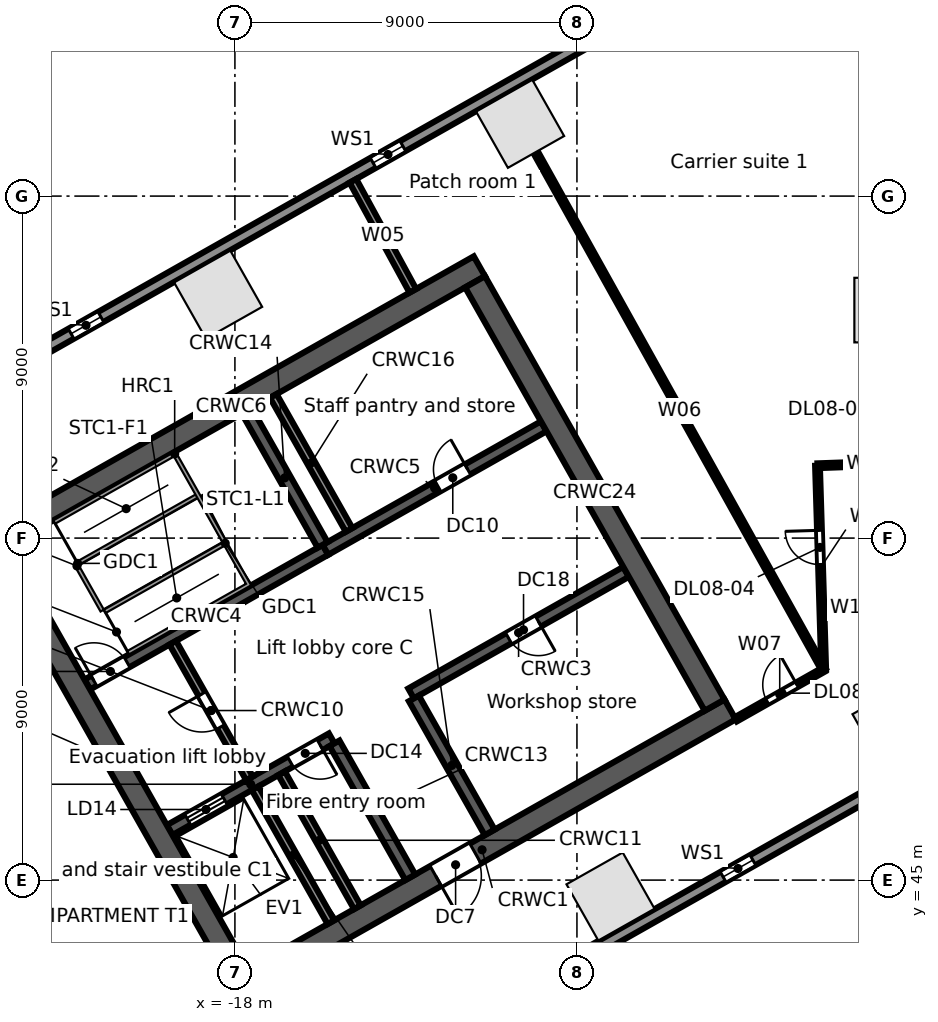
"""IFC4 building model, lengths in metres.
Left out: names, types, materials, properties, quantities, classifications, styles, units other than length and angle.
Written with IfcOpenShell. Run it as: python <this file> out.ifc"""

import sys

from ifc_helpers import new_model, si_unit, direction, frame, frame_2d, origin, origin_2d, place, context, subcontext, project, spatial, rectangle, extrude, element, fill, save


model = new_model("IFC4")
c1 = context("Model", 3, precision=1e-05, world=origin(), true_north=direction((0.0, 1.0)))
c2 = subcontext(c1, "Body", "Model", "MODEL_VIEW")
j1 = project(units=[si_unit("LENGTHUNIT", "METRE"), si_unit("PLANEANGLEUNIT", "RADIAN")], contexts=[c1])
p1 = place(None, origin())
s1 = spatial("IfcSite", under=j1, at=p1, CompositionType="ELEMENT")
p2 = place(p1, origin())
s2 = spatial("IfcBuilding", under=s1, at=p2, CompositionType="ELEMENT")
p3 = place(p2, frame((0.0, 0.0, 41.5)))
s3 = spatial("IfcBuildingStorey", under=s2, at=p3, CompositionType="ELEMENT", Elevation=41.5)
for number, where, z_axis, x_axis in (
    (1, (-10.495, 64.902, 0.0), (0.0, 0.0, 1.0), (-0.87, -0.492, 0.0)),
    (2, (-18.441, 60.406, 0.0), (0.0, 0.0, 1.0), (-0.87, -0.492, 0.0)),
    (3, (-8.117, 44.568, 0.0), (0.0, 0.0, 1.0), (0.87, 0.492, 0.0)),
    (4, (-0.591, 49.044, 0.0), (0.0, 0.0, 1.0), (0.87, 0.492, 0.0)),
    (5, (-0.85, 60.0, 0.0), (0.0, 0.0, 1.0), (0.0, 1.0, 0.0)),
):
    element("IfcColumn", number, at=place(p3, frame(where, z_axis=z_axis, x_axis=x_axis)), inside=s3, PredefinedType="COLUMN", context=c2, shape_type="SweptSolid", body=[
        extrude(rectangle(XDim=1.7, YDim=1.7, at=origin_2d()), origin(), (0.0, 0.0, 1.0), 5.0),
    ])
p4 = place(p3, frame((-58.745, 38.764, 0.0), z_axis=(0.0, 0.0, 1.0), x_axis=(0.870355811726, 0.492423355453, 0.0)))
e6 = element("IfcWall", 6, at=p4, inside=s3, PredefinedType="STANDARD", context=c2, shape_type="SweptSolid", body=[
    extrude(rectangle(XDim=64.025, YDim=0.3, at=frame_2d((32.013, 0.0))), origin(), (0.0, 0.0, 1.0), 4.68),
])
p5 = place(p4, frame((60.122, 0.0, 0.6)))
e7 = element("IfcOpeningElement", 7, at=p5, cuts=e6, PredefinedType="OPENING", context=c2, shape_type="SweptSolid", body=[
    extrude(rectangle(XDim=0.9, YDim=3.2, at=frame_2d((0.45, 1.6))), frame((0.0, 0.16, 0.0), z_axis=(0.0, -1.0, 0.0), x_axis=(1.0, 0.0, 0.0)), (0.0, 0.0, 1.0), 0.32),
])
p6 = place(p4, frame((50.992, 0.0, 0.6)))
e8 = element("IfcOpeningElement", 8, at=p6, cuts=e6, PredefinedType="OPENING", context=c2, shape_type="SweptSolid", body=[
    extrude(rectangle(XDim=0.9, YDim=3.2, at=frame_2d((0.45, 1.6))), frame((0.0, 0.16, 0.0), z_axis=(0.0, -1.0, 0.0), x_axis=(1.0, 0.0, 0.0)), (0.0, 0.0, 1.0), 0.32),
])
p7 = place(p4, frame((41.862, 0.0, 0.6)))
e9 = element("IfcOpeningElement", 9, at=p7, cuts=e6, PredefinedType="OPENING", context=c2, shape_type="SweptSolid", body=[
    extrude(rectangle(XDim=0.9, YDim=3.2, at=frame_2d((0.45, 1.6))), frame((0.0, 0.16, 0.0), z_axis=(0.0, -1.0, 0.0), x_axis=(1.0, 0.0, 0.0)), (0.0, 0.0, 1.0), 0.32),
])
p8 = place(p4, frame((32.732, 0.0, 0.6)))
e10 = element("IfcOpeningElement", 10, at=p8, cuts=e6, PredefinedType="OPENING", context=c2, shape_type="SweptSolid", body=[
    extrude(rectangle(XDim=0.9, YDim=3.2, at=frame_2d((0.45, 1.6))), frame((0.0, 0.16, 0.0), z_axis=(0.0, -1.0, 0.0), x_axis=(1.0, 0.0, 0.0)), (0.0, 0.0, 1.0), 0.32),
])
p9 = place(p4, frame((23.602, 0.0, 0.6)))
e11 = element("IfcOpeningElement", 11, at=p9, cuts=e6, PredefinedType="OPENING", context=c2, shape_type="SweptSolid", body=[
    extrude(rectangle(XDim=0.9, YDim=3.2, at=frame_2d((0.45, 1.6))), frame((0.0, 0.16, 0.0), z_axis=(0.0, -1.0, 0.0), x_axis=(1.0, 0.0, 0.0)), (0.0, 0.0, 1.0), 0.32),
])
p10 = place(p4, frame((14.472, 0.0, 0.6)))
e12 = element("IfcOpeningElement", 12, at=p10, cuts=e6, PredefinedType="OPENING", context=c2, shape_type="SweptSolid", body=[
    extrude(rectangle(XDim=0.9, YDim=3.2, at=frame_2d((0.45, 1.6))), frame((0.0, 0.16, 0.0), z_axis=(0.0, -1.0, 0.0), x_axis=(1.0, 0.0, 0.0)), (0.0, 0.0, 1.0), 0.32),
])
p11 = place(p4, frame((5.342, 0.0, 0.6)))
e13 = element("IfcOpeningElement", 13, at=p11, cuts=e6, PredefinedType="OPENING", context=c2, shape_type="SweptSolid", body=[
    extrude(rectangle(XDim=0.9, YDim=3.2, at=frame_2d((0.45, 1.6))), frame((0.0, 0.16, 0.0), z_axis=(0.0, -1.0, 0.0), x_axis=(1.0, 0.0, 0.0)), (0.0, 0.0, 1.0), 0.32),
])
p12 = place(p3, frame((-0.055, 47.969, 0.0), z_axis=(0.0, 0.0, 1.0), x_axis=(-0.870355730478, -0.492423499058, 0.0)))
e14 = element("IfcWall", 14, at=p12, inside=s3, PredefinedType="STANDARD", context=c2, shape_type="SweptSolid", body=[
    extrude(rectangle(XDim=43.75, YDim=0.3, at=frame_2d((21.875, 0.0))), origin(), (0.0, 0.0, 1.0), 4.68),
])
p13 = place(p12, frame((39.977, 0.0, 0.6)))
e15 = element("IfcOpeningElement", 15, at=p13, cuts=e14, PredefinedType="OPENING", context=c2, shape_type="SweptSolid", body=[
    extrude(rectangle(XDim=0.9, YDim=3.2, at=frame_2d((0.45, 1.6))), frame((0.0, 0.16, 0.0), z_axis=(0.0, -1.0, 0.0), x_axis=(1.0, 0.0, 0.0)), (0.0, 0.0, 1.0), 0.32),
])
p14 = place(p12, frame((31.222, 0.0, 0.6)))
e16 = element("IfcOpeningElement", 16, at=p14, cuts=e14, PredefinedType="OPENING", context=c2, shape_type="SweptSolid", body=[
    extrude(rectangle(XDim=0.9, YDim=3.2, at=frame_2d((0.45, 1.6))), frame((0.0, 0.16, 0.0), z_axis=(0.0, -1.0, 0.0), x_axis=(1.0, 0.0, 0.0)), (0.0, 0.0, 1.0), 0.32),
])
p15 = place(p12, frame((22.468, 0.0, 0.6)))
e17 = element("IfcOpeningElement", 17, at=p15, cuts=e14, PredefinedType="OPENING", context=c2, shape_type="SweptSolid", body=[
    extrude(rectangle(XDim=0.9, YDim=3.2, at=frame_2d((0.45, 1.6))), frame((0.0, 0.16, 0.0), z_axis=(0.0, -1.0, 0.0), x_axis=(1.0, 0.0, 0.0)), (0.0, 0.0, 1.0), 0.32),
])
p16 = place(p12, frame((13.713, 0.0, 0.6)))
e18 = element("IfcOpeningElement", 18, at=p16, cuts=e14, PredefinedType="OPENING", context=c2, shape_type="SweptSolid", body=[
    extrude(rectangle(XDim=0.9, YDim=3.2, at=frame_2d((0.45, 1.6))), frame((0.0, 0.16, 0.0), z_axis=(0.0, -1.0, 0.0), x_axis=(1.0, 0.0, 0.0)), (0.0, 0.0, 1.0), 0.32),
])
p17 = place(p12, frame((4.959, 0.0, 0.6)))
e19 = element("IfcOpeningElement", 19, at=p17, cuts=e14, PredefinedType="OPENING", context=c2, shape_type="SweptSolid", body=[
    extrude(rectangle(XDim=0.9, YDim=3.2, at=frame_2d((0.45, 1.6))), frame((0.0, 0.16, 0.0), z_axis=(0.0, -1.0, 0.0), x_axis=(1.0, 0.0, 0.0)), (0.0, 0.0, 1.0), 0.32),
])
p18 = place(p3, frame((-18.024, 42.104, 0.0), z_axis=(0.0, 0.0, 1.0), x_axis=(0.870360574057, 0.492414937962, 0.0)))
e20 = element("IfcWall", 20, at=p18, inside=s3, PredefinedType="SOLIDWALL", context=c2, shape_type="SweptSolid", body=[
    extrude(rectangle(XDim=15.0, YDim=0.6, at=frame_2d((7.5, 0.0))), origin(), (0.0, 0.0, 1.0), 4.68),
])
p19 = place(p18, frame((6.1, 0.0, 0.0)))
e21 = element("IfcOpeningElement", 21, at=p19, cuts=e20, PredefinedType="OPENING", context=c2, shape_type="SweptSolid", body=[
    extrude(rectangle(XDim=1.2, YDim=2.1, at=frame_2d((0.6, 1.05))), frame((0.0, 0.31, 0.0), z_axis=(0.0, -1.0, 0.0), x_axis=(1.0, 0.0, 0.0)), (0.0, 0.0, 1.0), 0.62),
])
p20 = place(p3, frame((-19.718, 46.316, 0.0), z_axis=(0.0, 0.0, 1.0), x_axis=(0.870353963862, 0.492426621528, 0.0)))
e22 = element("IfcWall", 22, at=p20, inside=s3, PredefinedType="SOLIDWALL", context=c2, shape_type="SweptSolid", body=[
    extrude(rectangle(XDim=4.9, YDim=0.3, at=frame_2d((2.45, 0.0))), origin(), (0.0, 0.0, 1.0), 4.68),
])
p21 = place(p20, frame((0.55, 0.0, 0.0)))
e23 = element("IfcOpeningElement", 23, at=p21, cuts=e22, PredefinedType="OPENING", context=c2, shape_type="SweptSolid", body=[
    extrude(rectangle(XDim=1.1, YDim=2.1, at=frame_2d((0.55, 1.05))), frame((0.0, 0.16, 0.0), z_axis=(0.0, -1.0, 0.0), x_axis=(1.0, 0.0, 0.0)), (0.0, 0.0, 1.0), 0.32),
])
p22 = place(p20, frame((3.65, 0.0, 0.0)))
e24 = element("IfcOpeningElement", 24, at=p22, cuts=e22, PredefinedType="OPENING", context=c2, shape_type="SweptSolid", body=[
    extrude(rectangle(XDim=0.9, YDim=2.1, at=frame_2d((0.45, 1.05))), frame((0.0, 0.16, 0.0), z_axis=(0.0, -1.0, 0.0), x_axis=(1.0, 0.0, 0.0)), (0.0, 0.0, 1.0), 0.32),
])
p23 = place(p3, frame((-13.365, 49.911, 0.0), z_axis=(0.0, 0.0, 1.0), x_axis=(0.870340995471, 0.49244954219, 0.0)))
e25 = element("IfcWall", 25, at=p23, inside=s3, PredefinedType="SOLIDWALL", context=c2, shape_type="SweptSolid", body=[
    extrude(rectangle(XDim=6.5, YDim=0.3, at=frame_2d((3.25, 0.0))), origin(), (0.0, 0.0, 1.0), 4.68),
])
p24 = place(p23, frame((2.95, 0.0, 0.0)))
e26 = element("IfcOpeningElement", 26, at=p24, cuts=e25, PredefinedType="OPENING", context=c2, shape_type="SweptSolid", body=[
    extrude(rectangle(XDim=0.9, YDim=2.1, at=frame_2d((0.45, 1.05))), frame((0.0, 0.16, 0.0), z_axis=(0.0, -1.0, 0.0), x_axis=(1.0, 0.0, 0.0)), (0.0, 0.0, 1.0), 0.32),
])
p25 = place(p3, frame((-21.885, 50.146, 0.0), z_axis=(0.0, 0.0, 1.0), x_axis=(0.870359411463, 0.492416992881, 0.0)))
e27 = element("IfcWall", 27, at=p25, inside=s3, PredefinedType="SOLIDWALL", context=c2, shape_type="SweptSolid", body=[
    extrude(rectangle(XDim=7.2, YDim=0.3, at=frame_2d((3.6, 0.0))), origin(), (0.0, 0.0, 1.0), 4.68),
])
p26 = place(p25, frame((0.2, 0.0, 0.0)))
e28 = element("IfcOpeningElement", 28, at=p26, cuts=e27, PredefinedType="OPENING", context=c2, shape_type="SweptSolid", body=[
    extrude(rectangle(XDim=1.0, YDim=2.1, at=frame_2d((0.5, 1.05))), frame((0.0, 0.16, 0.0), z_axis=(0.0, -1.0, 0.0), x_axis=(1.0, 0.0, 0.0)), (0.0, 0.0, 1.0), 0.32),
])
p27 = place(p3, frame((-15.618, 53.691, 0.0), z_axis=(0.0, 0.0, 1.0), x_axis=(0.870356769198, 0.492421663121, 0.0)))
e29 = element("IfcWall", 29, at=p27, inside=s3, PredefinedType="SOLIDWALL", context=c2, shape_type="SweptSolid", body=[
    extrude(rectangle(XDim=6.6, YDim=0.3, at=frame_2d((3.3, 0.0))), origin(), (0.0, 0.0, 1.0), 4.68),
])
p28 = place(p27, frame((3.4, 0.0, 0.0)))
e30 = element("IfcOpeningElement", 30, at=p28, cuts=e29, PredefinedType="OPENING", context=c2, shape_type="SweptSolid", body=[
    extrude(rectangle(XDim=0.9, YDim=2.1, at=frame_2d((0.45, 1.05))), frame((0.0, 0.16, 0.0), z_axis=(0.0, -1.0, 0.0), x_axis=(1.0, 0.0, 0.0)), (0.0, 0.0, 1.0), 0.32),
])
p29 = place(p3, frame((-24.623, 53.767, 0.0), z_axis=(0.0, 0.0, 1.0), x_axis=(0.870356627484, 0.492421913601, 0.0)))
e31 = element("IfcWall", 31, at=p29, inside=s3, PredefinedType="SOLIDWALL", context=c2, shape_type="SweptSolid", body=[
    extrude(rectangle(XDim=15.0, YDim=0.6, at=frame_2d((7.5, 0.0))), origin(), (0.0, 0.0, 1.0), 4.68),
])
p30 = place(p3, frame((-24.214, 53.654, 0.0), z_axis=(0.0, 0.0, 1.0), x_axis=(0.492441221355, -0.870345703448, 0.0)))
e32 = element("IfcWall", 32, at=p30, inside=s3, PredefinedType="SOLIDWALL", context=c2, shape_type="SweptSolid", body=[
    extrude(rectangle(XDim=12.8, YDim=0.6, at=frame_2d((6.4, 0.0))), origin(), (0.0, 0.0, 1.0), 4.68),
])
p31 = place(p3, frame((-17.469, 47.417, 0.0), z_axis=(0.0, 0.0, 1.0), x_axis=(0.492440575896, -0.870346068648, 0.0)))
e33 = element("IfcWall", 33, at=p31, inside=s3, PredefinedType="SOLIDWALL", context=c2, shape_type="SweptSolid", body=[
    extrude(rectangle(XDim=4.05, YDim=0.2, at=frame_2d((2.025, 0.0))), origin(), (0.0, 0.0, 1.0), 4.68),
])
p32 = place(p3, frame((-19.635, 51.246, 0.0), z_axis=(0.0, 0.0, 1.0), x_axis=(0.492408451753, -0.87036424366, 0.0)))
e34 = element("IfcWall", 34, at=p32, inside=s3, PredefinedType="PARTITIONING", context=c2, shape_type="SweptSolid", body=[
    extrude(rectangle(XDim=4.1, YDim=0.2, at=frame_2d((2.05, 0.0))), origin(), (0.0, 0.0, 1.0), 4.68),
])
p33 = place(p32, frame((1.55, 0.0, 0.0)))
e35 = element("IfcOpeningElement", 35, at=p33, cuts=e34, PredefinedType="OPENING", context=c2, shape_type="SweptSolid", body=[
    extrude(rectangle(XDim=1.0, YDim=2.1, at=frame_2d((0.5, 1.05))), frame((0.0, 0.11, 0.0), z_axis=(0.0, -1.0, 0.0), x_axis=(1.0, 0.0, 0.0)), (0.0, 0.0, 1.0), 0.22),
])
p34 = place(p3, frame((-16.772, 47.811, 0.0), z_axis=(0.0, 0.0, 1.0), x_axis=(0.492440575896, -0.870346068648, 0.0)))
e36 = element("IfcWall", 36, at=p34, inside=s3, PredefinedType="SOLIDWALL", context=c2, shape_type="SweptSolid", body=[
    extrude(rectangle(XDim=4.05, YDim=0.2, at=frame_2d((2.025, 0.0))), origin(), (0.0, 0.0, 1.0), 4.68),
])
p35 = place(p3, frame((-15.379, 48.599, 0.0), z_axis=(0.0, 0.0, 1.0), x_axis=(0.492394910396, -0.870371904542, 0.0)))
e37 = element("IfcWall", 37, at=p35, inside=s3, PredefinedType="SOLIDWALL", context=c2, shape_type="SweptSolid", body=[
    extrude(rectangle(XDim=4.05, YDim=0.3, at=frame_2d((2.025, 0.0))), origin(), (0.0, 0.0, 1.0), 4.68),
])
p36 = place(p3, frame((-17.686, 57.347, 0.0), z_axis=(0.0, 0.0, 1.0), x_axis=(0.492420746998, -0.870357287513, 0.0)))
e38 = element("IfcWall", 38, at=p36, inside=s3, PredefinedType="SOLIDWALL", context=c2, shape_type="SweptSolid", body=[
    extrude(rectangle(XDim=4.05, YDim=0.3, at=frame_2d((2.025, 0.0))), origin(), (0.0, 0.0, 1.0), 4.68),
])
p37 = place(p3, frame((-13.291, 49.781, 0.0), z_axis=(0.0, 0.0, 1.0), x_axis=(0.492394910396, -0.870371904542, 0.0)))
e39 = element("IfcWall", 39, at=p37, inside=s3, PredefinedType="SOLIDWALL", context=c2, shape_type="SweptSolid", body=[
    extrude(rectangle(XDim=4.05, YDim=0.3, at=frame_2d((2.025, 0.0))), origin(), (0.0, 0.0, 1.0), 4.68),
])
p38 = place(p3, frame((-16.99, 57.741, 0.0), z_axis=(0.0, 0.0, 1.0), x_axis=(0.492394910396, -0.870371904542, 0.0)))
e40 = element("IfcWall", 40, at=p38, inside=s3, PredefinedType="SOLIDWALL", context=c2, shape_type="SweptSolid", body=[
    extrude(rectangle(XDim=4.05, YDim=0.2, at=frame_2d((2.025, 0.0))), origin(), (0.0, 0.0, 1.0), 4.68),
])
p39 = place(p3, frame((-11.681, 60.744, 0.0), z_axis=(0.0, 0.0, 1.0), x_axis=(0.492426772896, -0.870353878221, 0.0)))
e41 = element("IfcWall", 41, at=p39, inside=s3, PredefinedType="SOLIDWALL", context=c2, shape_type="SweptSolid", body=[
    extrude(rectangle(XDim=12.8, YDim=0.6, at=frame_2d((6.4, 0.0))), origin(), (0.0, 0.0, 1.0), 4.68),
])
p40 = place(p3, frame((-14.894, 63.401, 0.0), z_axis=(0.0, 0.0, 1.0), x_axis=(0.478389929376, -0.878147524891, 0.0)))
e42 = element("IfcWall", 42, at=p40, inside=s3, PredefinedType="PARTITIONING", context=c2, shape_type="SweptSolid", body=[
    extrude(rectangle(XDim=3.294, YDim=0.2, at=frame_2d((1.647, 0.0))), origin(), (0.0, 0.0, 1.0), 3.96),
])
p41 = place(p3, frame((-10.088, 64.155, 0.0), z_axis=(0.0, 0.0, 1.0), x_axis=(0.486446127767, -0.873710572661, 0.0)))
e43 = element("IfcWall", 43, at=p41, inside=s3, PredefinedType="PARTITIONING", context=c2, shape_type="SweptSolid", body=[
    extrude(rectangle(XDim=15.584, YDim=0.125, at=frame_2d((7.792, 0.0))), origin(), (0.0, 0.0, 1.0), 3.76),
])
p42 = place(p3, frame((-4.821, 49.23, 0.0), z_axis=(0.0, 0.0, 1.0), x_axis=(0.870371217631, 0.492396124598, 0.0)))
e44 = element("IfcWall", 44, at=p42, inside=s3, PredefinedType="PARTITIONING", context=c2, shape_type="SweptSolid", body=[
    extrude(rectangle(XDim=2.659, YDim=0.125, at=frame_2d((1.329, 0.0))), origin(), (0.0, 0.0, 1.0), 4.68),
])
p43 = place(p42, frame((0.95, 0.0, 0.0)))
e45 = element("IfcOpeningElement", 45, at=p43, cuts=e44, PredefinedType="OPENING", context=c2, shape_type="SweptSolid", body=[
    extrude(rectangle(XDim=0.9, YDim=2.1, at=frame_2d((0.45, 1.05))), frame((0.0, 0.073, 0.0), z_axis=(0.0, -1.0, 0.0), x_axis=(1.0, 0.0, 0.0)), (0.0, 0.0, 1.0), 0.145),
])
p44 = place(p3, frame((-2.67, 55.904, 0.0), z_axis=(0.0, 0.0, 1.0), x_axis=(0.030338701418, -0.999539675649, 0.0)))
e46 = element("IfcWall", 46, at=p44, inside=s3, PredefinedType="PARTITIONING", context=c2, shape_type="SweptSolid", body=[
    extrude(rectangle(XDim=5.367, YDim=0.125, at=frame_2d((2.684, 0.0))), origin(), (0.0, 0.0, 1.0), 4.68),
])
p45 = place(p44, frame((1.7, 0.0, 0.0)))
e47 = element("IfcOpeningElement", 47, at=p45, cuts=e46, PredefinedType="OPENING", context=c2, shape_type="SweptSolid", body=[
    extrude(rectangle(XDim=0.9, YDim=2.1, at=frame_2d((0.45, 1.05))), frame((0.0, 0.073, 0.0), z_axis=(0.0, -1.0, 0.0), x_axis=(1.0, 0.0, 0.0)), (0.0, 0.0, 1.0), 0.145),
])
p46 = place(p3, frame((-2.67, 55.904, 0.0), z_axis=(0.0, 0.0, 1.0), x_axis=(0.999354913865, 0.03591317494, 0.0)))
e48 = element("IfcWall", 48, at=p46, inside=s3, PredefinedType="PARTITIONING", context=c2, shape_type="SweptSolid", body=[
    extrude(rectangle(XDim=2.672, YDim=0.125, at=frame_2d((1.336, 0.0))), origin(), (0.0, 0.0, 1.0), 3.742),
])
p47 = place(p6, origin())
e49 = element("IfcWindow", 49, at=p47, inside=s3, PartitioningType="SINGLE_PANEL", PredefinedType="WINDOW", context=c2, shape_type="SweptSolid", body=[
    extrude(rectangle(XDim=0.9, YDim=3.2, at=frame_2d((0.45, 1.6))), frame((0.0, 0.03, 0.0), z_axis=(0.0, -1.0, 0.0), x_axis=(1.0, 0.0, 0.0)), (0.0, 0.0, 1.0), 0.06),
])
fill(e8, e49)
p48 = place(p7, origin())
e50 = element("IfcWindow", 50, at=p48, inside=s3, PartitioningType="SINGLE_PANEL", PredefinedType="WINDOW", context=c2, shape_type="SweptSolid", body=[
    extrude(rectangle(XDim=0.9, YDim=3.2, at=frame_2d((0.45, 1.6))), frame((0.0, 0.03, 0.0), z_axis=(0.0, -1.0, 0.0), x_axis=(1.0, 0.0, 0.0)), (0.0, 0.0, 1.0), 0.06),
])
fill(e9, e50)
p49 = place(p17, origin())
e51 = element("IfcWindow", 51, at=p49, inside=s3, PartitioningType="SINGLE_PANEL", PredefinedType="WINDOW", context=c2, shape_type="SweptSolid", body=[
    extrude(rectangle(XDim=0.9, YDim=3.2, at=frame_2d((0.45, 1.6))), frame((0.0, 0.03, 0.0), z_axis=(0.0, -1.0, 0.0), x_axis=(1.0, 0.0, 0.0)), (0.0, 0.0, 1.0), 0.06),
])
fill(e19, e51)
p50 = place(p21, origin())
e52 = element("IfcDoor", 52, at=p50, inside=s3, OperationType="DOUBLE_DOOR_SLIDING", PredefinedType="DOOR", context=c2, shape_type="SweptSolid", body=[
    extrude(rectangle(XDim=1.1, YDim=2.1, at=frame_2d((0.55, 1.05))), frame((0.0, 0.025, 0.0), z_axis=(0.0, -1.0, 0.0), x_axis=(1.0, 0.0, 0.0)), (0.0, 0.0, 1.0), 0.05),
])
fill(e23, e52)
p51 = place(p26, origin())
e53 = element("IfcDoor", 53, at=p51, inside=s3, OperationType="SINGLE_SWING_LEFT", PredefinedType="DOOR", context=c2, shape_type="SweptSolid", body=[
    extrude(rectangle(XDim=1.0, YDim=2.1, at=frame_2d((0.5, 1.05))), frame((0.0, 0.025, 0.0), z_axis=(0.0, -1.0, 0.0), x_axis=(1.0, 0.0, 0.0)), (0.0, 0.0, 1.0), 0.05),
])
fill(e28, e53)
p52 = place(p33, frame((1.0, 0.0, 0.0), z_axis=(0.0, 0.0, 1.0), x_axis=(-1.0, 0.0, 0.0)))
e54 = element("IfcDoor", 54, at=p52, inside=s3, OperationType="SINGLE_SWING_RIGHT", PredefinedType="DOOR", context=c2, shape_type="SweptSolid", body=[
    extrude(rectangle(XDim=1.0, YDim=2.1, at=frame_2d((0.5, 1.05))), frame((0.0, 0.025, 0.0), z_axis=(0.0, -1.0, 0.0), x_axis=(1.0, 0.0, 0.0)), (0.0, 0.0, 1.0), 0.05),
])
fill(e35, e54)
p53 = place(p19, frame((1.2, 0.0, 0.0), z_axis=(0.0, 0.0, 1.0), x_axis=(-1.0, 0.0, 0.0)))
e55 = element("IfcDoor", 55, at=p53, inside=s3, OperationType="SINGLE_SWING_RIGHT", PredefinedType="DOOR", context=c2, shape_type="SweptSolid", body=[
    extrude(rectangle(XDim=1.2, YDim=2.1, at=frame_2d((0.6, 1.05))), frame((0.0, 0.025, 0.0), z_axis=(0.0, -1.0, 0.0), x_axis=(1.0, 0.0, 0.0)), (0.0, 0.0, 1.0), 0.05),
])
fill(e21, e55)
p54 = place(p28, origin())
e56 = element("IfcDoor", 56, at=p54, inside=s3, OperationType="SINGLE_SWING_RIGHT", PredefinedType="DOOR", context=c2, shape_type="SweptSolid", body=[
    extrude(rectangle(XDim=0.9, YDim=2.1, at=frame_2d((0.45, 1.05))), frame((0.0, 0.025, 0.0), z_axis=(0.0, -1.0, 0.0), x_axis=(1.0, 0.0, 0.0)), (0.0, 0.0, 1.0), 0.05),
])
fill(e30, e56)
p55 = place(p22, frame((0.9, 0.0, 0.0), z_axis=(0.0, 0.0, 1.0), x_axis=(-1.0, 0.0, 0.0)))
e57 = element("IfcDoor", 57, at=p55, inside=s3, OperationType="SINGLE_SWING_LEFT", PredefinedType="DOOR", context=c2, shape_type="SweptSolid", body=[
    extrude(rectangle(XDim=0.9, YDim=2.1, at=frame_2d((0.45, 1.05))), frame((0.0, 0.025, 0.0), z_axis=(0.0, -1.0, 0.0), x_axis=(1.0, 0.0, 0.0)), (0.0, 0.0, 1.0), 0.05),
])
fill(e24, e57)
p56 = place(p24, frame((0.9, 0.0, 0.0), z_axis=(0.0, 0.0, 1.0), x_axis=(-1.0, 0.0, 0.0)))
e58 = element("IfcDoor", 58, at=p56, inside=s3, OperationType="SINGLE_SWING_LEFT", PredefinedType="DOOR", context=c2, shape_type="SweptSolid", body=[
    extrude(rectangle(XDim=0.9, YDim=2.1, at=frame_2d((0.45, 1.05))), frame((0.0, 0.025, 0.0), z_axis=(0.0, -1.0, 0.0), x_axis=(1.0, 0.0, 0.0)), (0.0, 0.0, 1.0), 0.05),
])
fill(e26, e58)
p57 = place(p43, origin())
e59 = element("IfcDoor", 59, at=p57, inside=s3, OperationType="SINGLE_SWING_RIGHT", PredefinedType="DOOR", context=c2, shape_type="SweptSolid", body=[
    extrude(rectangle(XDim=0.9, YDim=2.1, at=frame_2d((0.45, 1.05))), frame((0.0, 0.025, 0.0), z_axis=(0.0, -1.0, 0.0), x_axis=(1.0, 0.0, 0.0)), (0.0, 0.0, 1.0), 0.05),
])
fill(e45, e59)
p58 = place(p45, frame((0.9, 0.0, 0.0), z_axis=(0.0, 0.0, 1.0), x_axis=(-1.0, 0.0, 0.0)))
e60 = element("IfcDoor", 60, at=p58, inside=s3, OperationType="SINGLE_SWING_RIGHT", PredefinedType="DOOR", context=c2, shape_type="SweptSolid", body=[
    extrude(rectangle(XDim=0.9, YDim=2.1, at=frame_2d((0.45, 1.05))), frame((0.0, 0.025, 0.0), z_axis=(0.0, -1.0, 0.0), x_axis=(1.0, 0.0, 0.0)), (0.0, 0.0, 1.0), 0.05),
])
fill(e47, e60)
save(model, sys.argv[1])
